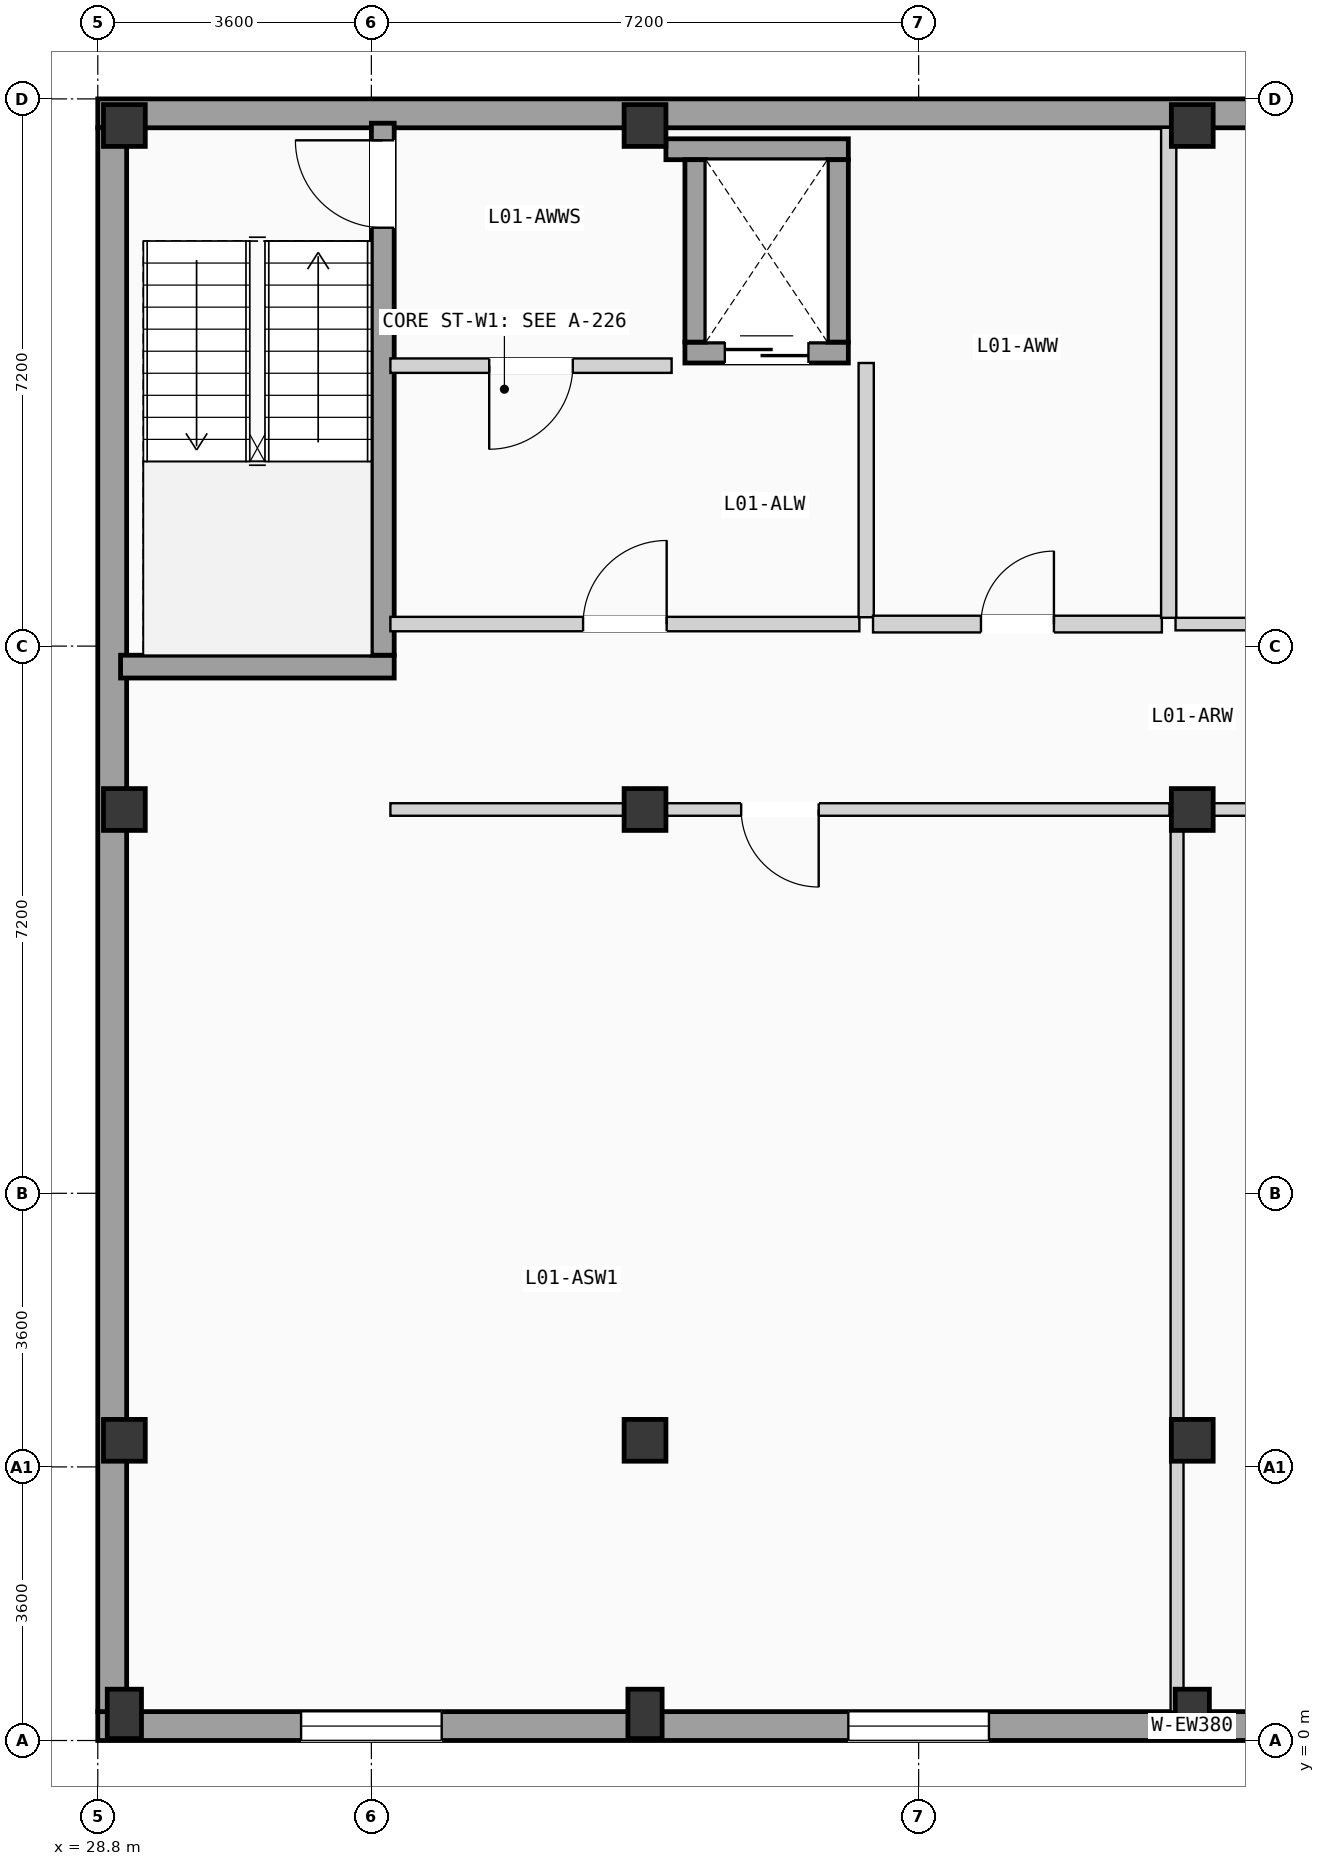
"""IFC4 building model, lengths in metres.
Left out: names, types, materials, properties, quantities, classifications, styles, units other than length and angle.
Written with IfcOpenShell. Run it as: python <this file> out.ifc"""

import sys

from ifc_helpers import new_model, si_unit, direction, frame, frame_2d, origin, origin_2d, place, context, subcontext, project, spatial, rectangle, extrude, element, fill, save


model = new_model("IFC4")
c1 = context("Model", 3, precision=1e-05, world=origin(), true_north=direction((0.0, 1.0)))
c2 = subcontext(c1, "Body", "Model", "MODEL_VIEW")
j1 = project(units=[si_unit("LENGTHUNIT", "METRE"), si_unit("PLANEANGLEUNIT", "RADIAN")], contexts=[c1])
p1 = place(None, origin())
s1 = spatial("IfcSite", under=j1, at=p1, CompositionType="ELEMENT")
p2 = place(p1, origin())
s2 = spatial("IfcBuilding", under=s1, at=p2, CompositionType="ELEMENT")
p3 = place(p2, frame((0.0, 0.0, 4.9)))
s3 = spatial("IfcBuildingStorey", under=s2, at=p3, CompositionType="ELEMENT", Elevation=4.9)
p4 = place(p3, frame((29.15, 0.35, 0.0), z_axis=(0.0, 0.0, 1.0), x_axis=(1.0, 0.0, 0.0)))
e1 = element("IfcColumn", 1, at=p4, inside=s3, PredefinedType="PILASTER", context=c2, shape_type="SweptSolid", body=[
    extrude(rectangle(XDim=0.45, YDim=0.65, at=origin_2d()), origin(), (0.0, 0.0, 1.0), 3.675),
])
for number, where, z_axis, x_axis in (
    (2, (29.15, 3.95, 0.0), (0.0, 0.0, 1.0), (1.0, 0.0, 0.0)),
    (3, (29.15, 12.25, 0.0), (0.0, 0.0, 1.0), (1.0, 0.0, 0.0)),
    (4, (29.15, 21.25, 0.0), (0.0, 0.0, 1.0), (1.0, 0.0, 0.0)),
):
    element("IfcColumn", number, at=place(p3, frame(where, z_axis=z_axis, x_axis=x_axis)), inside=s3, PredefinedType="COLUMN", context=c2, shape_type="SweptSolid", body=[
        extrude(rectangle(XDim=0.55, YDim=0.55, at=origin_2d()), origin(), (0.0, 0.0, 1.0), 3.675),
    ])
p5 = place(p3, frame((36.0, 0.35, 0.0), z_axis=(0.0, 0.0, 1.0), x_axis=(1.0, 0.0, 0.0)))
e5 = element("IfcColumn", 5, at=p5, inside=s3, PredefinedType="PILASTER", context=c2, shape_type="SweptSolid", body=[
    extrude(rectangle(XDim=0.45, YDim=0.65, at=origin_2d()), origin(), (0.0, 0.0, 1.0), 3.675),
])
for number, where, z_axis, x_axis in (
    (6, (36.0, 3.95, 0.0), (0.0, 0.0, 1.0), (1.0, 0.0, 0.0)),
    (7, (36.0, 12.25, 0.0), (0.0, 0.0, 1.0), (1.0, 0.0, 0.0)),
    (8, (36.0, 21.25, 0.0), (0.0, 0.0, 1.0), (1.0, 0.0, 0.0)),
):
    element("IfcColumn", number, at=place(p3, frame(where, z_axis=z_axis, x_axis=x_axis)), inside=s3, PredefinedType="COLUMN", context=c2, shape_type="SweptSolid", body=[
        extrude(rectangle(XDim=0.55, YDim=0.55, at=origin_2d()), origin(), (0.0, 0.0, 1.0), 3.675),
    ])
p6 = place(p3, frame((43.2, 0.35, 0.0), z_axis=(0.0, 0.0, 1.0), x_axis=(1.0, 0.0, 0.0)))
e9 = element("IfcColumn", 9, at=p6, inside=s3, PredefinedType="PILASTER", context=c2, shape_type="SweptSolid", body=[
    extrude(rectangle(XDim=0.45, YDim=0.65, at=origin_2d()), origin(), (0.0, 0.0, 1.0), 3.675),
])
for number, where, z_axis, x_axis in (
    (10, (43.2, 3.95, 0.0), (0.0, 0.0, 1.0), (1.0, 0.0, 0.0)),
    (11, (43.2, 12.25, 0.0), (0.0, 0.0, 1.0), (1.0, 0.0, 0.0)),
    (12, (43.2, 21.25, 0.0), (0.0, 0.0, 1.0), (1.0, 0.0, 0.0)),
):
    element("IfcColumn", number, at=place(p3, frame(where, z_axis=z_axis, x_axis=x_axis)), inside=s3, PredefinedType="COLUMN", context=c2, shape_type="SweptSolid", body=[
        extrude(rectangle(XDim=0.55, YDim=0.55, at=origin_2d()), origin(), (0.0, 0.0, 1.0), 3.675),
    ])
p7 = place(p3, frame((28.8, 0.19, 0.0), z_axis=(0.0, 0.0, 1.0), x_axis=(1.0, 0.0, 0.0)))
e13 = element("IfcWall", 13, at=p7, inside=s3, PredefinedType="SOLIDWALL", context=c2, shape_type="SweptSolid", body=[
    extrude(rectangle(XDim=28.8, YDim=0.38, at=frame_2d((14.4, 0.0))), origin(), (0.0, 0.0, 1.0), 3.4),
])
p8 = place(p7, frame((2.675, 0.0, 0.85)))
e14 = element("IfcOpeningElement", 14, at=p8, cuts=e13, PredefinedType="OPENING", context=c2, shape_type="SweptSolid", body=[
    extrude(rectangle(XDim=1.85, YDim=1.2, at=frame_2d((0.925, 0.6))), frame((0.0, 0.2, 0.0), z_axis=(0.0, -1.0, 0.0), x_axis=(1.0, 0.0, 0.0)), (0.0, 0.0, 1.0), 0.4),
])
p9 = place(p7, frame((9.875, 0.0, 0.85)))
e15 = element("IfcOpeningElement", 15, at=p9, cuts=e13, PredefinedType="OPENING", context=c2, shape_type="SweptSolid", body=[
    extrude(rectangle(XDim=1.85, YDim=1.35, at=frame_2d((0.925, 0.675))), frame((0.0, 0.2, 0.0), z_axis=(0.0, -1.0, 0.0), x_axis=(1.0, 0.0, 0.0)), (0.0, 0.0, 1.0), 0.4),
])
p10 = place(p7, frame((17.075, 0.0, 0.85)))
e16 = element("IfcOpeningElement", 16, at=p10, cuts=e13, PredefinedType="OPENING", context=c2, shape_type="SweptSolid", body=[
    extrude(rectangle(XDim=1.85, YDim=1.5, at=frame_2d((0.925, 0.75))), frame((0.0, 0.2, 0.0), z_axis=(0.0, -1.0, 0.0), x_axis=(1.0, 0.0, 0.0)), (0.0, 0.0, 1.0), 0.4),
])
p11 = place(p7, frame((24.275, 0.0, 0.85)))
e17 = element("IfcOpeningElement", 17, at=p11, cuts=e13, PredefinedType="OPENING", context=c2, shape_type="SweptSolid", body=[
    extrude(rectangle(XDim=1.85, YDim=1.35, at=frame_2d((0.925, 0.675))), frame((0.0, 0.2, 0.0), z_axis=(0.0, -1.0, 0.0), x_axis=(1.0, 0.0, 0.0)), (0.0, 0.0, 1.0), 0.4),
])
p12 = place(p3, frame((28.8, 21.41, 0.0), z_axis=(0.0, 0.0, 1.0), x_axis=(1.0, 0.0, 0.0)))
e18 = element("IfcWall", 18, at=p12, inside=s3, PredefinedType="SOLIDWALL", context=c2, shape_type="SweptSolid", body=[
    extrude(rectangle(XDim=28.8, YDim=0.38, at=frame_2d((14.4, 0.0))), origin(), (0.0, 0.0, 1.0), 3.4),
])
p13 = place(p3, frame((28.99, 0.38, 0.0), z_axis=(0.0, 0.0, 1.0), x_axis=(0.0, 1.0, 0.0)))
e19 = element("IfcWall", 19, at=p13, inside=s3, PredefinedType="SOLIDWALL", context=c2, shape_type="SweptSolid", body=[
    extrude(rectangle(XDim=20.84, YDim=0.38, at=frame_2d((10.42, 0.0))), origin(), (0.0, 0.0, 1.0), 3.4),
])
p14 = place(p3, frame((29.1, 14.13, 0.0), z_axis=(0.0, 0.0, 1.0), x_axis=(1.0, 0.0, 0.0)))
e20 = element("IfcWall", 20, at=p14, inside=s3, PredefinedType="SHEAR", context=c2, shape_type="SweptSolid", body=[
    extrude(rectangle(XDim=3.6, YDim=0.3, at=frame_2d((1.8, 0.0))), origin(), (0.0, 0.0, 1.0), 3.4),
])
p15 = place(p3, frame((32.55, 14.28, 0.0), z_axis=(0.0, 0.0, 1.0), x_axis=(0.0, 1.0, 0.0)))
e21 = element("IfcWall", 21, at=p15, inside=s3, PredefinedType="SHEAR", context=c2, shape_type="SweptSolid", body=[
    extrude(rectangle(XDim=7.0, YDim=0.3, at=frame_2d((3.5, 0.0))), origin(), (0.0, 0.0, 1.0), 3.4),
])
p16 = place(p15, frame((5.625, 0.0, 0.0)))
e22 = element("IfcOpeningElement", 22, at=p16, cuts=e21, PredefinedType="OPENING", context=c2, shape_type="SweptSolid", body=[
    extrude(rectangle(XDim=1.15, YDim=2.12, at=frame_2d((0.575, 1.06))), frame((0.0, 0.16, 0.0), z_axis=(0.0, -1.0, 0.0), x_axis=(1.0, 0.0, 0.0)), (0.0, 0.0, 1.0), 0.32),
])
p17 = place(p3, frame((36.525, 18.262, 0.0), z_axis=(0.0, 0.0, 1.0), x_axis=(1.0, 0.0, 0.0)))
e23 = element("IfcWall", 23, at=p17, inside=s3, PredefinedType="SHEAR", context=c2, shape_type="SweptSolid", body=[
    extrude(rectangle(XDim=2.15, YDim=0.275, at=frame_2d((1.075, 0.0))), origin(), (0.0, 0.0, 1.0), 3.4),
])
p18 = place(p17, frame((0.525, 0.0, 0.0)))
e24 = element("IfcOpeningElement", 24, at=p18, cuts=e23, PredefinedType="OPENING", context=c2, shape_type="SweptSolid", body=[
    extrude(rectangle(XDim=1.1, YDim=2.15, at=frame_2d((0.55, 1.075))), frame((0.0, 0.147, 0.0), z_axis=(0.0, -1.0, 0.0), x_axis=(1.0, 0.0, 0.0)), (0.0, 0.0, 1.0), 0.295),
])
for number, where, z_axis, x_axis in (
    (25, (36.275, 20.938, 0.0), (0.0, 0.0, 1.0), (1.0, 0.0, 0.0)),
    (26, (36.663, 18.4, 0.0), (0.0, 0.0, 1.0), (0.0, 1.0, 0.0)),
    (27, (38.538, 18.4, 0.0), (0.0, 0.0, 1.0), (0.0, 1.0, 0.0)),
):
    element("IfcWall", number, at=place(p3, frame(where, z_axis=z_axis, x_axis=x_axis)), inside=s3, PredefinedType="SHEAR", context=c2, shape_type="SweptSolid", body=[
        extrude(rectangle(XDim=2.4, YDim=0.275, at=frame_2d((1.2, 0.0))), origin(), (0.0, 0.0, 1.0), 3.4),
    ])
p19 = place(p3, frame((32.65, 18.09, 0.0), z_axis=(0.0, 0.0, 1.0), x_axis=(1.0, 0.0, 0.0)))
e28 = element("IfcWall", 28, at=p19, inside=s3, PredefinedType="PARTITIONING", context=c2, shape_type="SweptSolid", body=[
    extrude(rectangle(XDim=3.7, YDim=0.19, at=frame_2d((1.85, 0.0))), origin(), (0.0, 0.0, 1.0), 3.39),
])
p20 = place(p19, frame((1.3, 0.0, 0.0)))
e29 = element("IfcOpeningElement", 29, at=p20, cuts=e28, PredefinedType="OPENING", context=c2, shape_type="SweptSolid", body=[
    extrude(rectangle(XDim=1.1, YDim=2.12, at=frame_2d((0.55, 1.06))), frame((0.0, 0.105, 0.0), z_axis=(0.0, -1.0, 0.0), x_axis=(1.0, 0.0, 0.0)), (0.0, 0.0, 1.0), 0.21),
])
p21 = place(p3, frame((32.65, 14.69, 0.0), z_axis=(0.0, 0.0, 1.0), x_axis=(1.0, 0.0, 0.0)))
e30 = element("IfcWall", 30, at=p21, inside=s3, PredefinedType="PARTITIONING", context=c2, shape_type="SweptSolid", body=[
    extrude(rectangle(XDim=6.17, YDim=0.19, at=frame_2d((3.085, 0.0))), origin(), (0.0, 0.0, 1.0), 3.39),
])
p22 = place(p21, frame((2.535, 0.0, 0.0)))
e31 = element("IfcOpeningElement", 31, at=p22, cuts=e30, PredefinedType="OPENING", context=c2, shape_type="SweptSolid", body=[
    extrude(rectangle(XDim=1.1, YDim=2.12, at=frame_2d((0.55, 1.06))), frame((0.0, 0.105, 0.0), z_axis=(0.0, -1.0, 0.0), x_axis=(1.0, 0.0, 0.0)), (0.0, 0.0, 1.0), 0.21),
])
p23 = place(p3, frame((38.91, 14.78, 0.0), z_axis=(0.0, 0.0, 1.0), x_axis=(0.0, 1.0, 0.0)))
e32 = element("IfcWall", 32, at=p23, inside=s3, PredefinedType="PLUMBINGWALL", context=c2, shape_type="SweptSolid", body=[
    extrude(rectangle(XDim=3.345, YDim=0.2, at=frame_2d((1.672, 0.0))), origin(), (0.0, 0.0, 1.0), 3.39),
])
p24 = place(p3, frame((32.65, 12.25, 0.0), z_axis=(0.0, 0.0, 1.0), x_axis=(1.0, 0.0, 0.0)))
e33 = element("IfcWall", 33, at=p24, inside=s3, PredefinedType="PARTITIONING", context=c2, shape_type="SweptSolid", body=[
    extrude(rectangle(XDim=10.25, YDim=0.165, at=frame_2d((5.125, 0.0))), origin(), (0.0, 0.0, 1.0), 2.72),
])
p25 = place(p24, frame((4.615, 0.0, 0.0)))
e34 = element("IfcOpeningElement", 34, at=p25, cuts=e33, PredefinedType="OPENING", context=c2, shape_type="SweptSolid", body=[
    extrude(rectangle(XDim=1.02, YDim=2.16, at=frame_2d((0.51, 1.08))), frame((0.0, 0.093, 0.0), z_axis=(0.0, -1.0, 0.0), x_axis=(1.0, 0.0, 0.0)), (0.0, 0.0, 1.0), 0.185),
])
p26 = place(p3, frame((43.1, 12.25, 0.0), z_axis=(0.0, 0.0, 1.0), x_axis=(1.0, 0.0, 0.0)))
e35 = element("IfcWall", 35, at=p26, inside=s3, PredefinedType="PARTITIONING", context=c2, shape_type="SweptSolid", body=[
    extrude(rectangle(XDim=10.65, YDim=0.165, at=frame_2d((5.325, 0.0))), origin(), (0.0, 0.0, 1.0), 2.72),
])
p27 = place(p26, frame((4.815, 0.0, 0.0)))
e36 = element("IfcOpeningElement", 36, at=p27, cuts=e35, PredefinedType="OPENING", context=c2, shape_type="SweptSolid", body=[
    extrude(rectangle(XDim=1.02, YDim=2.16, at=frame_2d((0.51, 1.08))), frame((0.0, 0.093, 0.0), z_axis=(0.0, -1.0, 0.0), x_axis=(1.0, 0.0, 0.0)), (0.0, 0.0, 1.0), 0.185),
])
p28 = place(p3, frame((39.0, 14.69, 0.0), z_axis=(0.0, 0.0, 1.0), x_axis=(1.0, 0.0, 0.0)))
e37 = element("IfcWall", 37, at=p28, inside=s3, PredefinedType="PLUMBINGWALL", context=c2, shape_type="SweptSolid", body=[
    extrude(rectangle(XDim=3.8, YDim=0.22, at=frame_2d((1.9, 0.0))), origin(), (0.0, 0.0, 1.0), 3.39),
])
p29 = place(p28, frame((1.42, 0.0, 0.0)))
e38 = element("IfcOpeningElement", 38, at=p29, cuts=e37, PredefinedType="OPENING", context=c2, shape_type="SweptSolid", body=[
    extrude(rectangle(XDim=0.96, YDim=2.05, at=frame_2d((0.48, 1.025))), frame((0.0, 0.12, 0.0), z_axis=(0.0, -1.0, 0.0), x_axis=(1.0, 0.0, 0.0)), (0.0, 0.0, 1.0), 0.24),
])
p30 = place(p3, frame((42.98, 14.69, 0.0), z_axis=(0.0, 0.0, 1.0), x_axis=(1.0, 0.0, 0.0)))
e39 = element("IfcWall", 39, at=p30, inside=s3, PredefinedType="PARTITIONING", context=c2, shape_type="SweptSolid", body=[
    extrude(rectangle(XDim=8.54, YDim=0.165, at=frame_2d((4.27, 0.0))), origin(), (0.0, 0.0, 1.0), 3.39),
])
p31 = place(p30, frame((3.76, 0.0, 0.0)))
e40 = element("IfcOpeningElement", 40, at=p31, cuts=e39, PredefinedType="OPENING", context=c2, shape_type="SweptSolid", body=[
    extrude(rectangle(XDim=1.02, YDim=2.16, at=frame_2d((0.51, 1.08))), frame((0.0, 0.093, 0.0), z_axis=(0.0, -1.0, 0.0), x_axis=(1.0, 0.0, 0.0)), (0.0, 0.0, 1.0), 0.185),
])
p32 = place(p3, frame((43.0, 0.38, 0.0), z_axis=(0.0, 0.0, 1.0), x_axis=(0.0, 1.0, 0.0)))
e41 = element("IfcWall", 41, at=p32, inside=s3, PredefinedType="PARTITIONING", context=c2, shape_type="SweptSolid", body=[
    extrude(rectangle(XDim=11.788, YDim=0.17, at=frame_2d((5.894, 0.0))), origin(), (0.0, 0.0, 1.0), 2.77),
])
p33 = place(p3, frame((42.89, 14.772, 0.0), z_axis=(0.0, 0.0, 1.0), x_axis=(0.0, 1.0, 0.0)))
e42 = element("IfcWall", 42, at=p33, inside=s3, PredefinedType="PLUMBINGWALL", context=c2, shape_type="SweptSolid", body=[
    extrude(rectangle(XDim=6.448, YDim=0.2, at=frame_2d((3.224, 0.0))), origin(), (0.0, 0.0, 1.0), 2.77),
])
p34 = place(p8, origin())
e43 = element("IfcWindow", 43, at=p34, inside=s3, PartitioningType="DOUBLE_PANEL_VERTICAL", PredefinedType="WINDOW", context=c2, shape_type="SweptSolid", body=[
    extrude(rectangle(XDim=1.85, YDim=1.2, at=frame_2d((0.925, 0.6))), frame((0.0, 0.03, 0.0), z_axis=(0.0, -1.0, 0.0), x_axis=(1.0, 0.0, 0.0)), (0.0, 0.0, 1.0), 0.06),
])
fill(e14, e43)
p35 = place(p9, origin())
e44 = element("IfcWindow", 44, at=p35, inside=s3, PartitioningType="DOUBLE_PANEL_VERTICAL", PredefinedType="WINDOW", context=c2, shape_type="SweptSolid", body=[
    extrude(rectangle(XDim=1.85, YDim=1.35, at=frame_2d((0.925, 0.675))), frame((0.0, 0.03, 0.0), z_axis=(0.0, -1.0, 0.0), x_axis=(1.0, 0.0, 0.0)), (0.0, 0.0, 1.0), 0.06),
])
fill(e15, e44)
p36 = place(p16, origin())
e45 = element("IfcDoor", 45, at=p36, inside=s3, OperationType="SINGLE_SWING_RIGHT", PredefinedType="DOOR", context=c2, shape_type="SweptSolid", body=[
    extrude(rectangle(XDim=1.15, YDim=2.12, at=frame_2d((0.575, 1.06))), frame((0.0, 0.025, 0.0), z_axis=(0.0, -1.0, 0.0), x_axis=(1.0, 0.0, 0.0)), (0.0, 0.0, 1.0), 0.05),
])
fill(e22, e45)
p37 = place(p18, origin())
e46 = element("IfcDoor", 46, at=p37, inside=s3, OperationType="SLIDING_TO_LEFT", PredefinedType="DOOR", context=c2, shape_type="SweptSolid", body=[
    extrude(rectangle(XDim=1.1, YDim=2.15, at=frame_2d((0.55, 1.075))), frame((0.0, 0.025, 0.0), z_axis=(0.0, -1.0, 0.0), x_axis=(1.0, 0.0, 0.0)), (0.0, 0.0, 1.0), 0.05),
])
fill(e24, e46)
p38 = place(p20, frame((1.1, 0.0, 0.0), z_axis=(0.0, 0.0, 1.0), x_axis=(-1.0, 0.0, 0.0)))
e47 = element("IfcDoor", 47, at=p38, inside=s3, OperationType="SINGLE_SWING_LEFT", PredefinedType="DOOR", context=c2, shape_type="SweptSolid", body=[
    extrude(rectangle(XDim=1.1, YDim=2.12, at=frame_2d((0.55, 1.06))), frame((0.0, 0.025, 0.0), z_axis=(0.0, -1.0, 0.0), x_axis=(1.0, 0.0, 0.0)), (0.0, 0.0, 1.0), 0.05),
])
fill(e29, e47)
p39 = place(p22, origin())
e48 = element("IfcDoor", 48, at=p39, inside=s3, OperationType="SINGLE_SWING_RIGHT", PredefinedType="DOOR", context=c2, shape_type="SweptSolid", body=[
    extrude(rectangle(XDim=1.1, YDim=2.12, at=frame_2d((0.55, 1.06))), frame((0.0, 0.025, 0.0), z_axis=(0.0, -1.0, 0.0), x_axis=(1.0, 0.0, 0.0)), (0.0, 0.0, 1.0), 0.05),
])
fill(e31, e48)
p40 = place(p25, frame((1.02, 0.0, 0.0), z_axis=(0.0, 0.0, 1.0), x_axis=(-1.0, 0.0, 0.0)))
e49 = element("IfcDoor", 49, at=p40, inside=s3, OperationType="SINGLE_SWING_RIGHT", PredefinedType="DOOR", context=c2, shape_type="SweptSolid", body=[
    extrude(rectangle(XDim=1.02, YDim=2.16, at=frame_2d((0.51, 1.08))), frame((0.0, 0.025, 0.0), z_axis=(0.0, -1.0, 0.0), x_axis=(1.0, 0.0, 0.0)), (0.0, 0.0, 1.0), 0.05),
])
fill(e34, e49)
p41 = place(p29, origin())
e50 = element("IfcDoor", 50, at=p41, inside=s3, OperationType="SINGLE_SWING_RIGHT", PredefinedType="DOOR", context=c2, shape_type="SweptSolid", body=[
    extrude(rectangle(XDim=0.96, YDim=2.05, at=frame_2d((0.48, 1.025))), frame((0.0, 0.025, 0.0), z_axis=(0.0, -1.0, 0.0), x_axis=(1.0, 0.0, 0.0)), (0.0, 0.0, 1.0), 0.05),
])
fill(e38, e50)
save(model, sys.argv[1])
